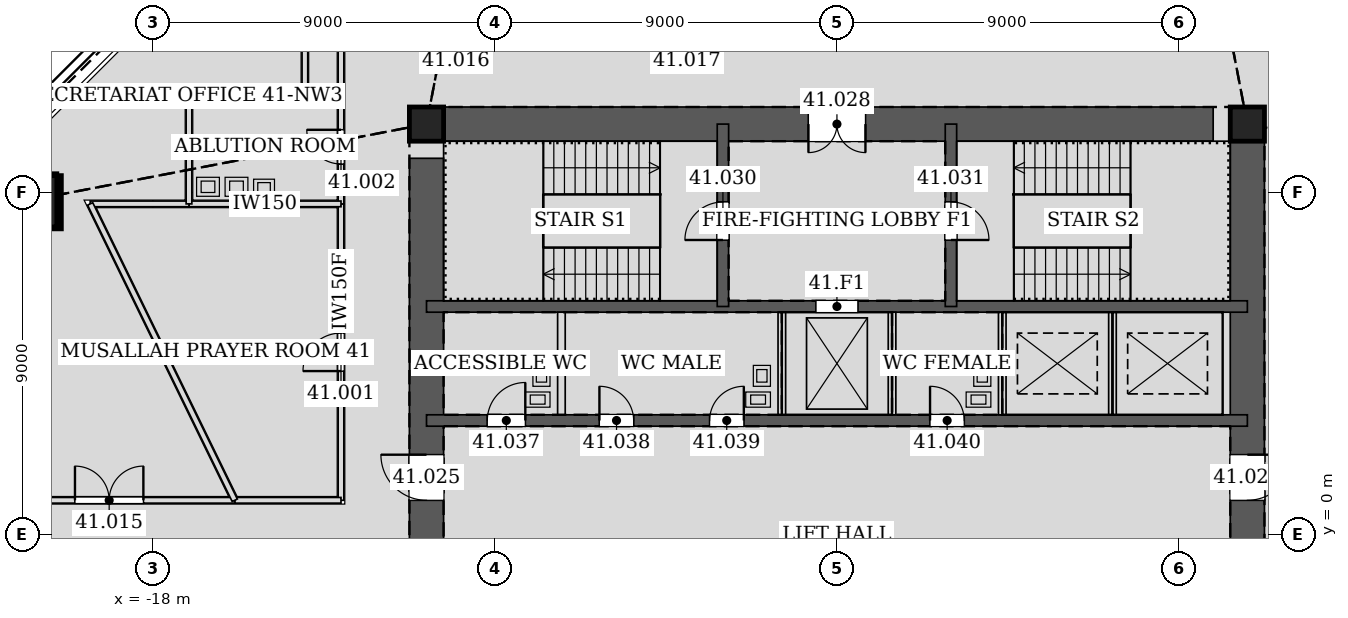
"""IFC4 building model, lengths in metres.
Left out: names, types, materials, properties, quantities, classifications, styles, units other than length and angle.
Written with IfcOpenShell. Run it as: python <this file> out.ifc"""

import sys

from ifc_helpers import new_model, si_unit, direction, frame, frame_2d, origin, origin_2d, place, context, subcontext, project, spatial, rectangle, hollow_rectangle, extrude, element, fill, save


model = new_model("IFC4")
c1 = context("Model", 3, precision=1e-05, world=origin(), true_north=direction((0.0, 1.0)))
c2 = subcontext(c1, "Body", "Model", "MODEL_VIEW")
j1 = project(units=[si_unit("LENGTHUNIT", "METRE"), si_unit("PLANEANGLEUNIT", "RADIAN")], contexts=[c1])
p1 = place(None, origin())
s1 = spatial("IfcSite", under=j1, at=p1, CompositionType="ELEMENT")
p2 = place(p1, origin())
s2 = spatial("IfcBuilding", under=s1, at=p2, CompositionType="ELEMENT")
p3 = place(p2, frame((0.0, 0.0, 180.6)))
s3 = spatial("IfcBuildingStorey", under=s2, at=p3, CompositionType="ELEMENT", Elevation=180.6)
p4 = place(p3, frame((-21.228, 8.793, 0.0), z_axis=(0.028237693676, -0.011678552323, 0.999533012997), x_axis=(0.382183844423, 0.924086310396, 0.0)))
e1 = element("IfcColumn", 1, at=p4, inside=s3, PredefinedType="COLUMN", context=c2, shape_type="SweptSolid", body=[
    extrude(hollow_rectangle(XDim=1.4, YDim=1.4, WallThickness=0.065, at=origin_2d()), origin(), (0.0, 0.0, 1.0), 4.202),
])
for number, where, z_axis, x_axis in (
    (2, (10.8, 10.8, 0.0), (0.0, 0.0, 1.0), (1.0, 0.0, 0.0)),
    (3, (-10.8, 10.8, 0.0), (0.0, 0.0, 1.0), (1.0, 0.0, 0.0)),
):
    element("IfcColumn", number, at=place(p3, frame(where, z_axis=z_axis, x_axis=x_axis)), inside=s3, PredefinedType="COLUMN", context=c2, shape_type="SweptSolid", body=[
        extrude(hollow_rectangle(XDim=0.9, YDim=0.9, WallThickness=0.06, at=origin_2d()), origin(), (0.0, 0.0, 1.0), 4.2),
    ])
p5 = place(p3, frame((10.8, -10.8, 0.0), z_axis=(0.0, 0.0, 1.0), x_axis=(0.0, 1.0, 0.0)))
e4 = element("IfcWall", 4, at=p5, inside=s3, PredefinedType="SOLIDWALL", context=c2, shape_type="SweptSolid", body=[
    extrude(rectangle(XDim=21.6, YDim=0.9, at=frame_2d((10.8, 0.0))), origin(), (0.0, 0.0, 1.0), 4.2),
])
p6 = place(p5, frame((11.7, 0.0, 0.0)))
e5 = element("IfcOpeningElement", 5, at=p6, cuts=e4, PredefinedType="OPENING", context=c2, shape_type="SweptSolid", body=[
    extrude(rectangle(XDim=1.2, YDim=2.1, at=frame_2d((0.6, 1.05))), frame((0.0, 0.46, 0.0), z_axis=(0.0, -1.0, 0.0), x_axis=(1.0, 0.0, 0.0)), (0.0, 0.0, 1.0), 0.92),
])
p7 = place(p5, frame((8.7, 0.0, 0.0)))
e6 = element("IfcOpeningElement", 6, at=p7, cuts=e4, PredefinedType="OPENING", context=c2, shape_type="SweptSolid", body=[
    extrude(rectangle(XDim=1.2, YDim=2.1, at=frame_2d((0.6, 1.05))), frame((0.0, 0.46, 0.0), z_axis=(0.0, -1.0, 0.0), x_axis=(1.0, 0.0, 0.0)), (0.0, 0.0, 1.0), 0.92),
])
p8 = place(p3, frame((10.8, 10.8, 0.0), z_axis=(0.0, 0.0, 1.0), x_axis=(-1.0, 0.0, 0.0)))
e7 = element("IfcWall", 7, at=p8, inside=s3, PredefinedType="SOLIDWALL", context=c2, shape_type="SweptSolid", body=[
    extrude(rectangle(XDim=21.6, YDim=0.9, at=frame_2d((10.8, 0.0))), origin(), (0.0, 0.0, 1.0), 4.2),
])
p9 = place(p8, frame((10.05, 0.0, 0.0)))
e8 = element("IfcOpeningElement", 8, at=p9, cuts=e7, PredefinedType="OPENING", context=c2, shape_type="SweptSolid", body=[
    extrude(rectangle(XDim=1.5, YDim=2.1, at=frame_2d((0.75, 1.05))), frame((0.0, 0.46, 0.0), z_axis=(0.0, -1.0, 0.0), x_axis=(1.0, 0.0, 0.0)), (0.0, 0.0, 1.0), 0.92),
])
p10 = place(p3, frame((-10.8, 10.8, 0.0), z_axis=(0.0, 0.0, 1.0), x_axis=(0.0, -1.0, 0.0)))
e9 = element("IfcWall", 9, at=p10, inside=s3, PredefinedType="SOLIDWALL", context=c2, shape_type="SweptSolid", body=[
    extrude(rectangle(XDim=21.6, YDim=0.9, at=frame_2d((10.8, 0.0))), origin(), (0.0, 0.0, 1.0), 4.2),
])
p11 = place(p10, frame((8.7, 0.0, 0.0)))
e10 = element("IfcOpeningElement", 10, at=p11, cuts=e9, PredefinedType="OPENING", context=c2, shape_type="SweptSolid", body=[
    extrude(rectangle(XDim=1.2, YDim=2.1, at=frame_2d((0.6, 1.05))), frame((0.0, 0.46, 0.0), z_axis=(0.0, -1.0, 0.0), x_axis=(1.0, 0.0, 0.0)), (0.0, 0.0, 1.0), 0.92),
])
p12 = place(p10, frame((11.7, 0.0, 0.0)))
e11 = element("IfcOpeningElement", 11, at=p12, cuts=e9, PredefinedType="OPENING", context=c2, shape_type="SweptSolid", body=[
    extrude(rectangle(XDim=1.2, YDim=2.1, at=frame_2d((0.6, 1.05))), frame((0.0, 0.46, 0.0), z_axis=(0.0, -1.0, 0.0), x_axis=(1.0, 0.0, 0.0)), (0.0, 0.0, 1.0), 0.92),
])
p13 = place(p3, frame((-10.8, 3.0, 0.0), z_axis=(0.0, 0.0, 1.0), x_axis=(1.0, 0.0, 0.0)))
e12 = element("IfcWall", 12, at=p13, inside=s3, PredefinedType="SOLIDWALL", context=c2, shape_type="SweptSolid", body=[
    extrude(rectangle(XDim=21.6, YDim=0.3, at=frame_2d((10.8, 0.0))), origin(), (0.0, 0.0, 1.0), 4.2),
])
p14 = place(p13, frame((1.6, 0.0, 0.0)))
e13 = element("IfcOpeningElement", 13, at=p14, cuts=e12, PredefinedType="OPENING", context=c2, shape_type="SweptSolid", body=[
    extrude(rectangle(XDim=1.0, YDim=2.1, at=frame_2d((0.5, 1.05))), frame((0.0, 0.16, 0.0), z_axis=(0.0, -1.0, 0.0), x_axis=(1.0, 0.0, 0.0)), (0.0, 0.0, 1.0), 0.32),
])
p15 = place(p13, frame((4.55, 0.0, 0.0)))
e14 = element("IfcOpeningElement", 14, at=p15, cuts=e12, PredefinedType="OPENING", context=c2, shape_type="SweptSolid", body=[
    extrude(rectangle(XDim=0.9, YDim=2.1, at=frame_2d((0.45, 1.05))), frame((0.0, 0.16, 0.0), z_axis=(0.0, -1.0, 0.0), x_axis=(1.0, 0.0, 0.0)), (0.0, 0.0, 1.0), 0.32),
])
p16 = place(p13, frame((7.45, 0.0, 0.0)))
e15 = element("IfcOpeningElement", 15, at=p16, cuts=e12, PredefinedType="OPENING", context=c2, shape_type="SweptSolid", body=[
    extrude(rectangle(XDim=0.9, YDim=2.1, at=frame_2d((0.45, 1.05))), frame((0.0, 0.16, 0.0), z_axis=(0.0, -1.0, 0.0), x_axis=(1.0, 0.0, 0.0)), (0.0, 0.0, 1.0), 0.32),
])
p17 = place(p13, frame((13.25, 0.0, 0.0)))
e16 = element("IfcOpeningElement", 16, at=p17, cuts=e12, PredefinedType="OPENING", context=c2, shape_type="SweptSolid", body=[
    extrude(rectangle(XDim=0.9, YDim=2.1, at=frame_2d((0.45, 1.05))), frame((0.0, 0.16, 0.0), z_axis=(0.0, -1.0, 0.0), x_axis=(1.0, 0.0, 0.0)), (0.0, 0.0, 1.0), 0.32),
])
p18 = place(p3, frame((-10.8, 6.0, 0.0), z_axis=(0.0, 0.0, 1.0), x_axis=(1.0, 0.0, 0.0)))
e17 = element("IfcWall", 17, at=p18, inside=s3, PredefinedType="SOLIDWALL", context=c2, shape_type="SweptSolid", body=[
    extrude(rectangle(XDim=21.6, YDim=0.3, at=frame_2d((10.8, 0.0))), origin(), (0.0, 0.0, 1.0), 4.2),
])
p19 = place(p18, frame((10.25, 0.0, 0.0)))
e18 = element("IfcOpeningElement", 18, at=p19, cuts=e17, PredefinedType="OPENING", context=c2, shape_type="SweptSolid", body=[
    extrude(rectangle(XDim=1.1, YDim=2.1, at=frame_2d((0.55, 1.05))), frame((0.0, 0.16, 0.0), z_axis=(0.0, -1.0, 0.0), x_axis=(1.0, 0.0, 0.0)), (0.0, 0.0, 1.0), 0.32),
])
p20 = place(p3, frame((-3.0, 6.0, 0.0), z_axis=(0.0, 0.0, 1.0), x_axis=(0.0, 1.0, 0.0)))
e19 = element("IfcWall", 19, at=p20, inside=s3, PredefinedType="SOLIDWALL", context=c2, shape_type="SweptSolid", body=[
    extrude(rectangle(XDim=4.8, YDim=0.3, at=frame_2d((2.4, 0.0))), origin(), (0.0, 0.0, 1.0), 4.2),
])
p21 = place(p20, frame((1.75, 0.0, 0.0)))
e20 = element("IfcOpeningElement", 20, at=p21, cuts=e19, PredefinedType="OPENING", context=c2, shape_type="SweptSolid", body=[
    extrude(rectangle(XDim=1.0, YDim=2.1, at=frame_2d((0.5, 1.05))), frame((0.0, 0.16, 0.0), z_axis=(0.0, -1.0, 0.0), x_axis=(1.0, 0.0, 0.0)), (0.0, 0.0, 1.0), 0.32),
])
p22 = place(p3, frame((3.0, 6.0, 0.0), z_axis=(0.0, 0.0, 1.0), x_axis=(0.0, 1.0, 0.0)))
e21 = element("IfcWall", 21, at=p22, inside=s3, PredefinedType="SOLIDWALL", context=c2, shape_type="SweptSolid", body=[
    extrude(rectangle(XDim=4.8, YDim=0.3, at=frame_2d((2.4, 0.0))), origin(), (0.0, 0.0, 1.0), 4.2),
])
p23 = place(p22, frame((1.75, 0.0, 0.0)))
e22 = element("IfcOpeningElement", 22, at=p23, cuts=e21, PredefinedType="OPENING", context=c2, shape_type="SweptSolid", body=[
    extrude(rectangle(XDim=1.0, YDim=2.1, at=frame_2d((0.5, 1.05))), frame((0.0, 0.16, 0.0), z_axis=(0.0, -1.0, 0.0), x_axis=(1.0, 0.0, 0.0)), (0.0, 0.0, 1.0), 0.32),
])
p24 = place(p3, frame((-13.05, 8.701, 0.0), z_axis=(0.0, 0.0, 1.0), x_axis=(0.0, -1.0, 0.0)))
e23 = element("IfcWall", 23, at=p24, inside=s3, PredefinedType="PARTITIONING", context=c2, shape_type="SweptSolid", body=[
    extrude(rectangle(XDim=7.801, YDim=0.15, at=frame_2d((3.9, 0.0))), origin(), (0.0, 0.0, 1.0), 4.035),
])
p25 = place(p24, frame((3.4, 0.0, 0.0)))
e24 = element("IfcOpeningElement", 24, at=p25, cuts=e23, PredefinedType="OPENING", context=c2, shape_type="SweptSolid", body=[
    extrude(rectangle(XDim=1.0, YDim=2.1, at=frame_2d((0.5, 1.05))), frame((0.0, 0.085, 0.0), z_axis=(0.0, -1.0, 0.0), x_axis=(1.0, 0.0, 0.0)), (0.0, 0.0, 1.0), 0.17),
])
p26 = place(p3, frame((-13.05, 0.9, 0.0), z_axis=(0.0, 0.0, 1.0), x_axis=(-1.0, 0.0, 0.0)))
e25 = element("IfcWall", 25, at=p26, inside=s3, PredefinedType="PARTITIONING", context=c2, shape_type="SweptSolid", body=[
    extrude(rectangle(XDim=2.797, YDim=0.15, at=frame_2d((1.398, 0.0))), origin(), (0.0, 0.0, 1.0), 3.426),
])
p27 = place(p3, frame((-13.05, 11.701, 0.0), z_axis=(0.0, 0.0, 1.0), x_axis=(0.0, -1.0, 0.0)))
e26 = element("IfcWall", 26, at=p27, inside=s3, PredefinedType="PARTITIONING", context=c2, shape_type="SweptSolid", body=[
    extrude(rectangle(XDim=3.002, YDim=0.15, at=frame_2d((1.501, 0.0))), origin(), (0.0, 0.0, 1.0), 3.167),
])
p28 = place(p27, frame((1.051, 0.0, 0.0)))
e27 = element("IfcOpeningElement", 27, at=p28, cuts=e26, PredefinedType="OPENING", context=c2, shape_type="SweptSolid", body=[
    extrude(rectangle(XDim=0.9, YDim=2.1, at=frame_2d((0.45, 1.05))), frame((0.0, 0.085, 0.0), z_axis=(0.0, -1.0, 0.0), x_axis=(1.0, 0.0, 0.0)), (0.0, 0.0, 1.0), 0.17),
])
p29 = place(p3, frame((-15.844, 0.9, 0.0), z_axis=(0.0, 0.0, 1.0), x_axis=(-1.0, 0.0, 0.0)))
e28 = element("IfcWall", 28, at=p29, inside=s3, PredefinedType="PARTITIONING", context=c2, shape_type="SweptSolid", body=[
    extrude(rectangle(XDim=7.045, YDim=0.15, at=frame_2d((3.523, 0.0))), origin(), (0.0, 0.0, 1.0), 3.426),
])
p30 = place(p29, frame((2.406, 0.0, 0.0)))
e29 = element("IfcOpeningElement", 29, at=p30, cuts=e28, PredefinedType="OPENING", context=c2, shape_type="SweptSolid", body=[
    extrude(rectangle(XDim=1.8, YDim=2.4, at=frame_2d((0.9, 1.2))), frame((0.0, 0.085, 0.0), z_axis=(0.0, -1.0, 0.0), x_axis=(1.0, 0.0, 0.0)), (0.0, 0.0, 1.0), 0.17),
])
p31 = place(p3, frame((-13.05, 13.05, 0.0), z_axis=(0.0, 0.0, 1.0), x_axis=(0.0, -1.0, 0.0)))
e30 = element("IfcWall", 30, at=p31, inside=s3, PredefinedType="PARTITIONING", context=c2, shape_type="SweptSolid", body=[
    extrude(rectangle(XDim=1.351, YDim=0.15, at=frame_2d((0.676, 0.0))), origin(), (0.0, 0.0, 1.0), 3.342),
])
p32 = place(p3, frame((-13.05, 8.7, 0.0), z_axis=(0.0, 0.0, 1.0), x_axis=(-1.0, 0.0, 0.0)))
e31 = element("IfcWall", 31, at=p32, inside=s3, PredefinedType="PARTITIONING", context=c2, shape_type="SweptSolid", body=[
    extrude(rectangle(XDim=4.001, YDim=0.15, at=frame_2d((2.0, 0.0))), origin(), (0.0, 0.0, 1.0), 3.426),
])
p33 = place(p3, frame((-17.049, 8.7, 0.0), z_axis=(0.0, 0.0, 1.0), x_axis=(-1.0, 0.0, 0.0)))
e32 = element("IfcWall", 32, at=p33, inside=s3, PredefinedType="PARTITIONING", context=c2, shape_type="SweptSolid", body=[
    extrude(rectangle(XDim=2.601, YDim=0.15, at=frame_2d((1.3, 0.0))), origin(), (0.0, 0.0, 1.0), 3.426),
])
p34 = place(p3, frame((-19.65, 8.7, 0.0), z_axis=(0.0, 0.0, 1.0), x_axis=(0.438358227548, -0.898800347319, 0.0)))
e33 = element("IfcWall", 33, at=p34, inside=s3, PredefinedType="PARTITIONING", context=c2, shape_type="SweptSolid", body=[
    extrude(rectangle(XDim=8.678, YDim=0.15, at=frame_2d((4.339, 0.0))), origin(), (0.0, 0.0, 1.0), 3.426),
])
p35 = place(p3, frame((-13.999, 11.7, 0.0), z_axis=(0.0, 0.0, 1.0), x_axis=(-1.0, 0.0, 0.0)))
e34 = element("IfcWall", 34, at=p35, inside=s3, PredefinedType="PARTITIONING", context=c2, shape_type="SweptSolid", body=[
    extrude(rectangle(XDim=3.051, YDim=0.15, at=frame_2d((1.525, 0.0))), origin(), (0.0, 0.0, 1.0), 3.618),
])
p36 = place(p3, frame((-17.05, 11.7, 0.0), z_axis=(0.0, 0.0, 1.0), x_axis=(0.0, -1.0, 0.0)))
e35 = element("IfcWall", 35, at=p36, inside=s3, PredefinedType="PARTITIONING", context=c2, shape_type="SweptSolid", body=[
    extrude(rectangle(XDim=3.0, YDim=0.15, at=frame_2d((1.5, 0.0))), origin(), (0.0, 0.0, 1.0), 3.167),
])
p37 = place(p3, frame((-13.05, 11.7, 0.0), z_axis=(0.0, 0.0, 1.0), x_axis=(-1.0, 0.0, 0.0)))
e36 = element("IfcWall", 36, at=p37, inside=s3, PredefinedType="PARTITIONING", context=c2, shape_type="SweptSolid", body=[
    extrude(rectangle(XDim=0.951, YDim=0.15, at=frame_2d((0.476, 0.0))), origin(), (0.0, 0.0, 1.0), 3.715),
])
p38 = place(p3, frame((-14.0, 11.7, 0.0), z_axis=(0.0, 0.0, 1.0), x_axis=(0.0, 1.0, 0.0)))
e37 = element("IfcWall", 37, at=p38, inside=s3, PredefinedType="PARTITIONING", context=c2, shape_type="SweptSolid", body=[
    extrude(rectangle(XDim=6.67, YDim=0.15, at=frame_2d((3.335, 0.0))), origin(), (0.0, 0.0, 1.0), 3.342),
])
for number, where, z_axis, x_axis in (
    (38, (-7.25, 3.15, 0.0), (0.0, 0.0, 1.0), (0.0, 1.0, 0.0)),
    (39, (-1.45, 3.15, 0.0), (0.0, 0.0, 1.0), (0.0, 1.0, 0.0)),
    (40, (1.45, 3.15, 0.0), (0.0, 0.0, 1.0), (0.0, 1.0, 0.0)),
    (41, (4.35, 3.15, 0.0), (0.0, 0.0, 1.0), (0.0, 1.0, 0.0)),
):
    element("IfcWall", number, at=place(p3, frame(where, z_axis=z_axis, x_axis=x_axis)), inside=s3, PredefinedType="PARTITIONING", context=c2, shape_type="SweptSolid", body=[
        extrude(rectangle(XDim=2.7, YDim=0.2, at=frame_2d((1.35, 0.0))), origin(), (0.0, 0.0, 1.0), 4.035),
    ])
p39 = place(p3, frame((7.25, 3.15, 0.0), z_axis=(0.0, 0.0, 1.0), x_axis=(0.0, 1.0, 0.0)))
e42 = element("IfcWall", 42, at=p39, inside=s3, PredefinedType="PARTITIONING", context=c2, shape_type="SweptSolid", body=[
    extrude(rectangle(XDim=2.7, YDim=0.2, at=frame_2d((1.35, 0.0))), origin(), (0.0, 0.0, 1.0), 4.2),
])
p40 = place(p25, frame((1.0, 0.0, 0.0), z_axis=(0.0, 0.0, 1.0), x_axis=(-1.0, 0.0, 0.0)))
e43 = element("IfcDoor", 43, at=p40, inside=s3, OperationType="SINGLE_SWING_LEFT", PredefinedType="DOOR", context=c2, shape_type="SweptSolid", body=[
    extrude(rectangle(XDim=1.0, YDim=2.1, at=frame_2d((0.5, 1.05))), frame((0.0, 0.025, 0.0), z_axis=(0.0, -1.0, 0.0), x_axis=(1.0, 0.0, 0.0)), (0.0, 0.0, 1.0), 0.05),
])
fill(e24, e43)
p41 = place(p28, frame((0.9, 0.0, 0.0), z_axis=(0.0, 0.0, 1.0), x_axis=(-1.0, 0.0, 0.0)))
e44 = element("IfcDoor", 44, at=p41, inside=s3, OperationType="SINGLE_SWING_RIGHT", PredefinedType="DOOR", context=c2, shape_type="SweptSolid", body=[
    extrude(rectangle(XDim=0.9, YDim=2.1, at=frame_2d((0.45, 1.05))), frame((0.0, 0.025, 0.0), z_axis=(0.0, -1.0, 0.0), x_axis=(1.0, 0.0, 0.0)), (0.0, 0.0, 1.0), 0.05),
])
fill(e27, e44)
p42 = place(p30, frame((1.8, 0.0, 0.0), z_axis=(0.0, 0.0, 1.0), x_axis=(-1.0, 0.0, 0.0)))
e45 = element("IfcDoor", 45, at=p42, inside=s3, OperationType="DOUBLE_DOOR_SINGLE_SWING", PredefinedType="DOOR", context=c2, shape_type="SweptSolid", body=[
    extrude(rectangle(XDim=1.8, YDim=2.4, at=frame_2d((0.9, 1.2))), frame((0.0, 0.025, 0.0), z_axis=(0.0, -1.0, 0.0), x_axis=(1.0, 0.0, 0.0)), (0.0, 0.0, 1.0), 0.05),
])
fill(e29, e45)
p43 = place(p6, frame((1.2, 0.0, 0.0), z_axis=(0.0, 0.0, 1.0), x_axis=(-1.0, 0.0, 0.0)))
e46 = element("IfcDoor", 46, at=p43, inside=s3, OperationType="SINGLE_SWING_LEFT", PredefinedType="DOOR", context=c2, shape_type="SweptSolid", body=[
    extrude(rectangle(XDim=1.2, YDim=2.1, at=frame_2d((0.6, 1.05))), frame((0.0, 0.025, 0.0), z_axis=(0.0, -1.0, 0.0), x_axis=(1.0, 0.0, 0.0)), (0.0, 0.0, 1.0), 0.05),
])
fill(e5, e46)
p44 = place(p11, frame((1.2, 0.0, 0.0), z_axis=(0.0, 0.0, 1.0), x_axis=(-1.0, 0.0, 0.0)))
e47 = element("IfcDoor", 47, at=p44, inside=s3, OperationType="SINGLE_SWING_RIGHT", PredefinedType="DOOR", context=c2, shape_type="SweptSolid", body=[
    extrude(rectangle(XDim=1.2, YDim=2.1, at=frame_2d((0.6, 1.05))), frame((0.0, 0.025, 0.0), z_axis=(0.0, -1.0, 0.0), x_axis=(1.0, 0.0, 0.0)), (0.0, 0.0, 1.0), 0.05),
])
fill(e10, e47)
p45 = place(p9, origin())
e48 = element("IfcDoor", 48, at=p45, inside=s3, OperationType="DOUBLE_DOOR_SINGLE_SWING", PredefinedType="DOOR", context=c2, shape_type="SweptSolid", body=[
    extrude(rectangle(XDim=1.5, YDim=2.1, at=frame_2d((0.75, 1.05))), frame((0.0, 0.025, 0.0), z_axis=(0.0, -1.0, 0.0), x_axis=(1.0, 0.0, 0.0)), (0.0, 0.0, 1.0), 0.05),
])
fill(e8, e48)
p46 = place(p21, origin())
e49 = element("IfcDoor", 49, at=p46, inside=s3, OperationType="SINGLE_SWING_LEFT", PredefinedType="DOOR", context=c2, shape_type="SweptSolid", body=[
    extrude(rectangle(XDim=1.0, YDim=2.1, at=frame_2d((0.5, 1.05))), frame((0.0, 0.025, 0.0), z_axis=(0.0, -1.0, 0.0), x_axis=(1.0, 0.0, 0.0)), (0.0, 0.0, 1.0), 0.05),
])
fill(e20, e49)
p47 = place(p23, frame((1.0, 0.0, 0.0), z_axis=(0.0, 0.0, 1.0), x_axis=(-1.0, 0.0, 0.0)))
e50 = element("IfcDoor", 50, at=p47, inside=s3, OperationType="SINGLE_SWING_RIGHT", PredefinedType="DOOR", context=c2, shape_type="SweptSolid", body=[
    extrude(rectangle(XDim=1.0, YDim=2.1, at=frame_2d((0.5, 1.05))), frame((0.0, 0.025, 0.0), z_axis=(0.0, -1.0, 0.0), x_axis=(1.0, 0.0, 0.0)), (0.0, 0.0, 1.0), 0.05),
])
fill(e22, e50)
p48 = place(p14, origin())
e51 = element("IfcDoor", 51, at=p48, inside=s3, OperationType="SINGLE_SWING_RIGHT", PredefinedType="DOOR", context=c2, shape_type="SweptSolid", body=[
    extrude(rectangle(XDim=1.0, YDim=2.1, at=frame_2d((0.5, 1.05))), frame((0.0, 0.025, 0.0), z_axis=(0.0, -1.0, 0.0), x_axis=(1.0, 0.0, 0.0)), (0.0, 0.0, 1.0), 0.05),
])
fill(e13, e51)
p49 = place(p15, origin())
e52 = element("IfcDoor", 52, at=p49, inside=s3, OperationType="SINGLE_SWING_LEFT", PredefinedType="DOOR", context=c2, shape_type="SweptSolid", body=[
    extrude(rectangle(XDim=0.9, YDim=2.1, at=frame_2d((0.45, 1.05))), frame((0.0, 0.025, 0.0), z_axis=(0.0, -1.0, 0.0), x_axis=(1.0, 0.0, 0.0)), (0.0, 0.0, 1.0), 0.05),
])
fill(e14, e52)
p50 = place(p16, origin())
e53 = element("IfcDoor", 53, at=p50, inside=s3, OperationType="SINGLE_SWING_RIGHT", PredefinedType="DOOR", context=c2, shape_type="SweptSolid", body=[
    extrude(rectangle(XDim=0.9, YDim=2.1, at=frame_2d((0.45, 1.05))), frame((0.0, 0.025, 0.0), z_axis=(0.0, -1.0, 0.0), x_axis=(1.0, 0.0, 0.0)), (0.0, 0.0, 1.0), 0.05),
])
fill(e15, e53)
p51 = place(p17, origin())
e54 = element("IfcDoor", 54, at=p51, inside=s3, OperationType="SINGLE_SWING_LEFT", PredefinedType="DOOR", context=c2, shape_type="SweptSolid", body=[
    extrude(rectangle(XDim=0.9, YDim=2.1, at=frame_2d((0.45, 1.05))), frame((0.0, 0.025, 0.0), z_axis=(0.0, -1.0, 0.0), x_axis=(1.0, 0.0, 0.0)), (0.0, 0.0, 1.0), 0.05),
])
fill(e16, e54)
p52 = place(p19, origin())
e55 = element("IfcDoor", 55, at=p52, inside=s3, OperationType="DOUBLE_DOOR_SLIDING", PredefinedType="DOOR", context=c2, shape_type="SweptSolid", body=[
    extrude(rectangle(XDim=1.1, YDim=2.1, at=frame_2d((0.55, 1.05))), frame((0.0, 0.025, 0.0), z_axis=(0.0, -1.0, 0.0), x_axis=(1.0, 0.0, 0.0)), (0.0, 0.0, 1.0), 0.05),
])
fill(e18, e55)
save(model, sys.argv[1])
